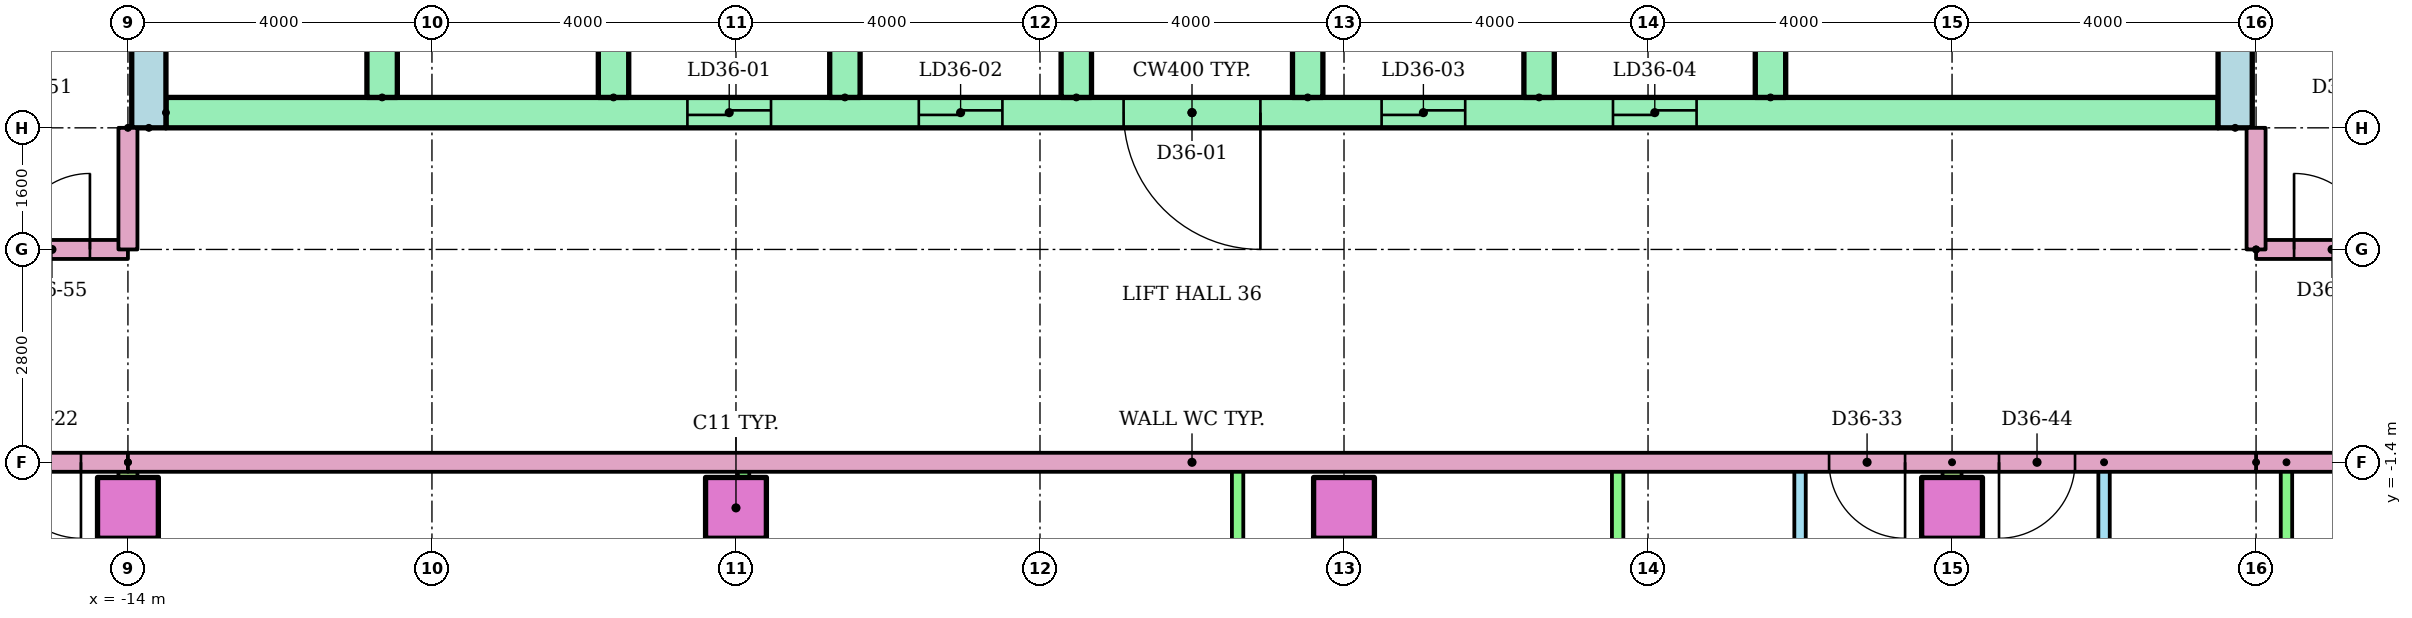
"""IFC4 building model, lengths in metres.
Left out: names, types, materials, properties, quantities, classifications, styles, units other than length and angle.
Written with IfcOpenShell. Run it as: python <this file> out.ifc"""

import sys

from ifc_helpers import new_model, si_unit, direction, frame, frame_2d, origin, origin_2d, place, context, subcontext, project, spatial, rectangle, extrude, element, fill, save


model = new_model("IFC4")
c1 = context("Model", 3, precision=1e-05, world=origin(), true_north=direction((0.0, 1.0)))
c2 = subcontext(c1, "Body", "Model", "MODEL_VIEW")
j1 = project(units=[si_unit("LENGTHUNIT", "METRE"), si_unit("PLANEANGLEUNIT", "RADIAN")], contexts=[c1])
p1 = place(None, origin())
s1 = spatial("IfcSite", under=j1, at=p1, CompositionType="ELEMENT")
p2 = place(p1, origin())
s2 = spatial("IfcBuilding", under=s1, at=p2, CompositionType="ELEMENT")
p3 = place(p2, frame((0.0, 0.0, 139.0)))
s3 = spatial("IfcBuildingStorey", under=s2, at=p3, CompositionType="ELEMENT", Elevation=139.0)
for number, where in (
    (1, (-14.0, -2.0, 0.0)),
    (2, (-6.0, -2.0, 0.0)),
    (3, (2.0, -2.0, 0.0)),
    (4, (10.0, -2.0, 0.0)),
):
    element("IfcColumn", number, at=place(p3, frame(where)), inside=s3, PredefinedType="COLUMN", context=c2, shape_type="SweptSolid", body=[
        extrude(rectangle(XDim=0.8, YDim=0.8, at=origin_2d()), origin(), (0.0, 0.0, 1.0), 3.2),
    ])
for number, where, z_axis, x_axis in (
    (5, (-13.725, 3.0, 0.0), (0.0, 0.0, 1.0), (0.0, 1.0, 0.0)),
    (6, (13.725, 3.0, 0.0), (0.0, 0.0, 1.0), (0.0, 1.0, 0.0)),
):
    element("IfcWall", number, at=place(p3, frame(where, z_axis=z_axis, x_axis=x_axis)), inside=s3, PredefinedType="SHEAR", context=c2, shape_type="SweptSolid", body=[
        extrude(rectangle(XDim=17.0, YDim=0.45, at=frame_2d((8.5, 0.0))), origin(), (0.0, 0.0, 1.0), 2.92),
    ])
p4 = place(p3, frame((-13.5, 3.2, 0.0)))
e7 = element("IfcWall", 7, at=p4, inside=s3, PredefinedType="SHEAR", context=c2, shape_type="SweptSolid", body=[
    extrude(rectangle(XDim=27.0, YDim=0.4, at=frame_2d((13.5, 0.0))), origin(), (0.0, 0.0, 1.0), 2.92),
])
p5 = place(p4, frame((6.861, 0.0, 0.0)))
e8 = element("IfcOpeningElement", 8, at=p5, cuts=e7, PredefinedType="OPENING", context=c2, shape_type="SweptSolid", body=[
    extrude(rectangle(XDim=1.1, YDim=2.1, at=frame_2d((0.55, 1.05))), frame((0.0, 0.21, 0.0), z_axis=(0.0, -1.0, 0.0), x_axis=(1.0, 0.0, 0.0)), (0.0, 0.0, 1.0), 0.42),
])
p6 = place(p4, frame((9.906, 0.0, 0.0)))
e9 = element("IfcOpeningElement", 9, at=p6, cuts=e7, PredefinedType="OPENING", context=c2, shape_type="SweptSolid", body=[
    extrude(rectangle(XDim=1.1, YDim=2.1, at=frame_2d((0.55, 1.05))), frame((0.0, 0.21, 0.0), z_axis=(0.0, -1.0, 0.0), x_axis=(1.0, 0.0, 0.0)), (0.0, 0.0, 1.0), 0.42),
])
p7 = place(p4, frame((15.994, 0.0, 0.0)))
e10 = element("IfcOpeningElement", 10, at=p7, cuts=e7, PredefinedType="OPENING", context=c2, shape_type="SweptSolid", body=[
    extrude(rectangle(XDim=1.1, YDim=2.1, at=frame_2d((0.55, 1.05))), frame((0.0, 0.21, 0.0), z_axis=(0.0, -1.0, 0.0), x_axis=(1.0, 0.0, 0.0)), (0.0, 0.0, 1.0), 0.42),
])
p8 = place(p4, frame((19.039, 0.0, 0.0)))
e11 = element("IfcOpeningElement", 11, at=p8, cuts=e7, PredefinedType="OPENING", context=c2, shape_type="SweptSolid", body=[
    extrude(rectangle(XDim=1.1, YDim=2.1, at=frame_2d((0.55, 1.05))), frame((0.0, 0.21, 0.0), z_axis=(0.0, -1.0, 0.0), x_axis=(1.0, 0.0, 0.0)), (0.0, 0.0, 1.0), 0.42),
])
p9 = place(p4, frame((12.6, 0.0, 0.0)))
e12 = element("IfcOpeningElement", 12, at=p9, cuts=e7, PredefinedType="OPENING", context=c2, shape_type="SweptSolid", body=[
    extrude(rectangle(XDim=1.8, YDim=2.1, at=frame_2d((0.9, 1.05))), frame((0.0, 0.21, 0.0), z_axis=(0.0, -1.0, 0.0), x_axis=(1.0, 0.0, 0.0)), (0.0, 0.0, 1.0), 0.42),
])
for number, where, z_axis, x_axis in (
    (13, (-10.656, 3.4, 0.0), (0.0, 0.0, 1.0), (0.0, 1.0, 0.0)),
    (14, (-7.611, 3.4, 0.0), (0.0, 0.0, 1.0), (0.0, 1.0, 0.0)),
    (15, (-4.567, 3.4, 0.0), (0.0, 0.0, 1.0), (0.0, 1.0, 0.0)),
    (16, (-1.522, 3.4, 0.0), (0.0, 0.0, 1.0), (0.0, 1.0, 0.0)),
    (17, (1.522, 3.4, 0.0), (0.0, 0.0, 1.0), (0.0, 1.0, 0.0)),
    (18, (4.567, 3.4, 0.0), (0.0, 0.0, 1.0), (0.0, 1.0, 0.0)),
    (19, (7.611, 3.4, 0.0), (0.0, 0.0, 1.0), (0.0, 1.0, 0.0)),
):
    element("IfcWall", number, at=place(p3, frame(where, z_axis=z_axis, x_axis=x_axis)), inside=s3, PredefinedType="SHEAR", context=c2, shape_type="SweptSolid", body=[
        extrude(rectangle(XDim=3.0, YDim=0.4, at=frame_2d((1.5, 0.0))), origin(), (0.0, 0.0, 1.0), 2.92),
    ])
p10 = place(p3, frame((8.0, -6.8, 0.0), z_axis=(0.0, 0.0, 1.0), x_axis=(0.0, 1.0, 0.0)))
e20 = element("IfcWall", 20, at=p10, inside=s3, PredefinedType="PARTITIONING", context=c2, shape_type="SweptSolid", body=[
    extrude(rectangle(XDim=5.4, YDim=0.15, at=frame_2d((2.7, 0.0))), origin(), (0.0, 0.0, 1.0), 2.4),
])
p11 = place(p10, frame((3.45, 0.0, 0.0)))
e21 = element("IfcOpeningElement", 21, at=p11, cuts=e20, PredefinedType="OPENING", context=c2, shape_type="SweptSolid", body=[
    extrude(rectangle(XDim=0.9, YDim=2.1, at=frame_2d((0.45, 1.05))), frame((0.0, 0.085, 0.0), z_axis=(0.0, -1.0, 0.0), x_axis=(1.0, 0.0, 0.0)), (0.0, 0.0, 1.0), 0.17),
])
p12 = place(p10, frame((0.8, 0.0, 0.0)))
e22 = element("IfcOpeningElement", 22, at=p12, cuts=e20, PredefinedType="OPENING", context=c2, shape_type="SweptSolid", body=[
    extrude(rectangle(XDim=0.8, YDim=2.1, at=frame_2d((0.4, 1.05))), frame((0.0, 0.085, 0.0), z_axis=(0.0, -1.0, 0.0), x_axis=(1.0, 0.0, 0.0)), (0.0, 0.0, 1.0), 0.17),
])
for number, where, z_axis, x_axis in (
    (23, (5.6, -6.8, 0.0), (0.0, 0.0, 1.0), (0.0, 1.0, 0.0)),
    (24, (0.6, -6.8, 0.0), (0.0, 0.0, 1.0), (0.0, 1.0, 0.0)),
    (25, (-5.9, -6.8, 0.0), (0.0, 0.0, 1.0), (0.0, 1.0, 0.0)),
):
    element("IfcWall", number, at=place(p3, frame(where, z_axis=z_axis, x_axis=x_axis)), inside=s3, PredefinedType="PARTITIONING", context=c2, shape_type="SweptSolid", body=[
        extrude(rectangle(XDim=5.4, YDim=0.15, at=frame_2d((2.7, 0.0))), origin(), (0.0, 0.0, 1.0), 2.4),
    ])
p13 = place(p3, frame((-14.0, -1.4, 0.0), z_axis=(0.0, 0.0, 1.0), x_axis=(0.0, -1.0, 0.0)))
e26 = element("IfcWall", 26, at=p13, inside=s3, PredefinedType="PARTITIONING", context=c2, shape_type="SweptSolid", body=[
    extrude(rectangle(XDim=14.91, YDim=0.25, at=frame_2d((7.455, 0.0))), origin(), (0.0, 0.0, 1.0), 2.4),
])
p14 = place(p3, frame((12.0, -1.4, 0.0), z_axis=(0.0, 0.0, 1.0), x_axis=(0.0, -1.0, 0.0)))
e27 = element("IfcWall", 27, at=p14, inside=s3, PredefinedType="PARTITIONING", context=c2, shape_type="SweptSolid", body=[
    extrude(rectangle(XDim=5.4, YDim=0.15, at=frame_2d((2.7, 0.0))), origin(), (0.0, 0.0, 1.0), 2.4),
])
p15 = place(p14, frame((1.05, 0.0, 0.0)))
e28 = element("IfcOpeningElement", 28, at=p15, cuts=e27, PredefinedType="OPENING", context=c2, shape_type="SweptSolid", body=[
    extrude(rectangle(XDim=0.9, YDim=2.1, at=frame_2d((0.45, 1.05))), frame((0.0, 0.085, 0.0), z_axis=(0.0, -1.0, 0.0), x_axis=(1.0, 0.0, 0.0)), (0.0, 0.0, 1.0), 0.17),
])
p16 = place(p14, frame((3.8, 0.0, 0.0)))
e29 = element("IfcOpeningElement", 29, at=p16, cuts=e27, PredefinedType="OPENING", context=c2, shape_type="SweptSolid", body=[
    extrude(rectangle(XDim=0.8, YDim=2.1, at=frame_2d((0.4, 1.05))), frame((0.0, 0.085, 0.0), z_axis=(0.0, -1.0, 0.0), x_axis=(1.0, 0.0, 0.0)), (0.0, 0.0, 1.0), 0.17),
])
p17 = place(p3, frame((14.4, -1.4, 0.0), z_axis=(0.0, 0.0, 1.0), x_axis=(0.0, -1.0, 0.0)))
e30 = element("IfcWall", 30, at=p17, inside=s3, PredefinedType="PARTITIONING", context=c2, shape_type="SweptSolid", body=[
    extrude(rectangle(XDim=5.4, YDim=0.15, at=frame_2d((2.7, 0.0))), origin(), (0.0, 0.0, 1.0), 2.4),
])
p18 = place(p3, frame((10.0, -1.4, 0.0), z_axis=(0.0, 0.0, 1.0), x_axis=(0.0, -1.0, 0.0)))
e31 = element("IfcWall", 31, at=p18, inside=s3, PredefinedType="PARTITIONING", context=c2, shape_type="SweptSolid", body=[
    extrude(rectangle(XDim=14.91, YDim=0.25, at=frame_2d((7.455, 0.0))), origin(), (0.0, 0.0, 1.0), 2.4),
])
p19 = place(p3, frame((-14.0, -1.4, 0.0), z_axis=(0.0, 0.0, 1.0), x_axis=(-1.0, 0.0, 0.0)))
e32 = element("IfcWall", 32, at=p19, inside=s3, PredefinedType="PARTITIONING", context=c2, shape_type="SweptSolid", body=[
    extrude(rectangle(XDim=15.0, YDim=0.25, at=frame_2d((7.5, 0.0))), origin(), (0.0, 0.0, 1.0), 2.4),
])
p20 = place(p19, frame((0.618, 0.0, 0.0)))
e33 = element("IfcOpeningElement", 33, at=p20, cuts=e32, PredefinedType="OPENING", context=c2, shape_type="SweptSolid", body=[
    extrude(rectangle(XDim=1.0, YDim=2.1, at=frame_2d((0.5, 1.05))), frame((0.0, 0.135, 0.0), z_axis=(0.0, -1.0, 0.0), x_axis=(1.0, 0.0, 0.0)), (0.0, 0.0, 1.0), 0.27),
])
p21 = place(p3, frame((29.0, -1.4, 0.0), z_axis=(0.0, 0.0, 1.0), x_axis=(-1.0, 0.0, 0.0)))
e34 = element("IfcWall", 34, at=p21, inside=s3, PredefinedType="PARTITIONING", context=c2, shape_type="SweptSolid", body=[
    extrude(rectangle(XDim=15.0, YDim=0.25, at=frame_2d((7.5, 0.0))), origin(), (0.0, 0.0, 1.0), 2.4),
])
p22 = place(p3, frame((-29.0, 1.4, 0.0)))
e35 = element("IfcWall", 35, at=p22, inside=s3, PredefinedType="PARTITIONING", context=c2, shape_type="SweptSolid", body=[
    extrude(rectangle(XDim=15.0, YDim=0.25, at=frame_2d((7.5, 0.0))), origin(), (0.0, 0.0, 1.0), 2.4),
])
p23 = place(p22, frame((5.382, 0.0, 0.0)))
e36 = element("IfcOpeningElement", 36, at=p23, cuts=e35, PredefinedType="OPENING", context=c2, shape_type="SweptSolid", body=[
    extrude(rectangle(XDim=1.0, YDim=2.1, at=frame_2d((0.5, 1.05))), frame((0.0, 0.135, 0.0), z_axis=(0.0, -1.0, 0.0), x_axis=(1.0, 0.0, 0.0)), (0.0, 0.0, 1.0), 0.27),
])
p24 = place(p22, frame((13.5, 0.0, 0.0)))
e37 = element("IfcOpeningElement", 37, at=p24, cuts=e35, PredefinedType="OPENING", context=c2, shape_type="SweptSolid", body=[
    extrude(rectangle(XDim=1.0, YDim=2.1, at=frame_2d((0.5, 1.05))), frame((0.0, 0.135, 0.0), z_axis=(0.0, -1.0, 0.0), x_axis=(1.0, 0.0, 0.0)), (0.0, 0.0, 1.0), 0.27),
])
p25 = place(p3, frame((14.0, 1.4, 0.0)))
e38 = element("IfcWall", 38, at=p25, inside=s3, PredefinedType="PARTITIONING", context=c2, shape_type="SweptSolid", body=[
    extrude(rectangle(XDim=15.0, YDim=0.25, at=frame_2d((7.5, 0.0))), origin(), (0.0, 0.0, 1.0), 2.4),
])
p26 = place(p25, frame((0.5, 0.0, 0.0)))
e39 = element("IfcOpeningElement", 39, at=p26, cuts=e38, PredefinedType="OPENING", context=c2, shape_type="SweptSolid", body=[
    extrude(rectangle(XDim=1.0, YDim=2.1, at=frame_2d((0.5, 1.05))), frame((0.0, 0.135, 0.0), z_axis=(0.0, -1.0, 0.0), x_axis=(1.0, 0.0, 0.0)), (0.0, 0.0, 1.0), 0.27),
])
p27 = place(p3, frame((14.0, -1.4, 0.0), z_axis=(0.0, 0.0, 1.0), x_axis=(-1.0, 0.0, 0.0)))
e40 = element("IfcWall", 40, at=p27, inside=s3, PredefinedType="PARTITIONING", context=c2, shape_type="SweptSolid", body=[
    extrude(rectangle(XDim=28.0, YDim=0.25, at=frame_2d((14.0, 0.0))), origin(), (0.0, 0.0, 1.0), 2.4),
])
p28 = place(p27, frame((4.618, 0.0, 0.0)))
e41 = element("IfcOpeningElement", 41, at=p28, cuts=e40, PredefinedType="OPENING", context=c2, shape_type="SweptSolid", body=[
    extrude(rectangle(XDim=1.0, YDim=2.1, at=frame_2d((0.5, 1.05))), frame((0.0, 0.135, 0.0), z_axis=(0.0, -1.0, 0.0), x_axis=(1.0, 0.0, 0.0)), (0.0, 0.0, 1.0), 0.27),
])
p29 = place(p27, frame((2.382, 0.0, 0.0)))
e42 = element("IfcOpeningElement", 42, at=p29, cuts=e40, PredefinedType="OPENING", context=c2, shape_type="SweptSolid", body=[
    extrude(rectangle(XDim=1.0, YDim=2.1, at=frame_2d((0.5, 1.05))), frame((0.0, 0.135, 0.0), z_axis=(0.0, -1.0, 0.0), x_axis=(1.0, 0.0, 0.0)), (0.0, 0.0, 1.0), 0.27),
])
for number, where, z_axis, x_axis in (
    (43, (-14.0, 3.0, 0.0), (0.0, 0.0, 1.0), (0.0, -1.0, 0.0)),
    (44, (14.0, 1.4, 0.0), (0.0, 0.0, 1.0), (0.0, 1.0, 0.0)),
):
    element("IfcWall", number, at=place(p3, frame(where, z_axis=z_axis, x_axis=x_axis)), inside=s3, PredefinedType="PARTITIONING", context=c2, shape_type="SweptSolid", body=[
        extrude(rectangle(XDim=1.6, YDim=0.25, at=frame_2d((0.8, 0.0))), origin(), (0.0, 0.0, 1.0), 2.4),
    ])
p30 = place(p5, origin())
e45 = element("IfcDoor", 45, at=p30, inside=s3, OperationType="SLIDING_TO_LEFT", PredefinedType="DOOR", context=c2, shape_type="SweptSolid", body=[
    extrude(rectangle(XDim=1.1, YDim=2.1, at=frame_2d((0.55, 1.05))), frame((0.0, 0.025, 0.0), z_axis=(0.0, -1.0, 0.0), x_axis=(1.0, 0.0, 0.0)), (0.0, 0.0, 1.0), 0.05),
])
fill(e8, e45)
p31 = place(p6, origin())
e46 = element("IfcDoor", 46, at=p31, inside=s3, OperationType="SLIDING_TO_LEFT", PredefinedType="DOOR", context=c2, shape_type="SweptSolid", body=[
    extrude(rectangle(XDim=1.1, YDim=2.1, at=frame_2d((0.55, 1.05))), frame((0.0, 0.025, 0.0), z_axis=(0.0, -1.0, 0.0), x_axis=(1.0, 0.0, 0.0)), (0.0, 0.0, 1.0), 0.05),
])
fill(e9, e46)
p32 = place(p7, origin())
e47 = element("IfcDoor", 47, at=p32, inside=s3, OperationType="SLIDING_TO_LEFT", PredefinedType="DOOR", context=c2, shape_type="SweptSolid", body=[
    extrude(rectangle(XDim=1.1, YDim=2.1, at=frame_2d((0.55, 1.05))), frame((0.0, 0.025, 0.0), z_axis=(0.0, -1.0, 0.0), x_axis=(1.0, 0.0, 0.0)), (0.0, 0.0, 1.0), 0.05),
])
fill(e10, e47)
p33 = place(p8, origin())
e48 = element("IfcDoor", 48, at=p33, inside=s3, OperationType="SLIDING_TO_LEFT", PredefinedType="DOOR", context=c2, shape_type="SweptSolid", body=[
    extrude(rectangle(XDim=1.1, YDim=2.1, at=frame_2d((0.55, 1.05))), frame((0.0, 0.025, 0.0), z_axis=(0.0, -1.0, 0.0), x_axis=(1.0, 0.0, 0.0)), (0.0, 0.0, 1.0), 0.05),
])
fill(e11, e48)
p34 = place(p9, frame((1.8, 0.0, 0.0), z_axis=(0.0, 0.0, 1.0), x_axis=(-1.0, 0.0, 0.0)))
e49 = element("IfcDoor", 49, at=p34, inside=s3, OperationType="DOUBLE_DOOR_SINGLE_SWING", PredefinedType="DOOR", context=c2, shape_type="SweptSolid", body=[
    extrude(rectangle(XDim=1.8, YDim=2.1, at=frame_2d((0.9, 1.05))), frame((0.0, 0.025, 0.0), z_axis=(0.0, -1.0, 0.0), x_axis=(1.0, 0.0, 0.0)), (0.0, 0.0, 1.0), 0.05),
])
fill(e12, e49)
p35 = place(p20, origin())
e50 = element("IfcDoor", 50, at=p35, inside=s3, OperationType="SINGLE_SWING_LEFT", PredefinedType="DOOR", context=c2, shape_type="SweptSolid", body=[
    extrude(rectangle(XDim=1.0, YDim=2.1, at=frame_2d((0.5, 1.05))), frame((0.0, 0.025, 0.0), z_axis=(0.0, -1.0, 0.0), x_axis=(1.0, 0.0, 0.0)), (0.0, 0.0, 1.0), 0.05),
])
fill(e33, e50)
p36 = place(p28, origin())
e51 = element("IfcDoor", 51, at=p36, inside=s3, OperationType="SINGLE_SWING_LEFT", PredefinedType="DOOR", context=c2, shape_type="SweptSolid", body=[
    extrude(rectangle(XDim=1.0, YDim=2.1, at=frame_2d((0.5, 1.05))), frame((0.0, 0.025, 0.0), z_axis=(0.0, -1.0, 0.0), x_axis=(1.0, 0.0, 0.0)), (0.0, 0.0, 1.0), 0.05),
])
fill(e41, e51)
p37 = place(p29, origin())
e52 = element("IfcDoor", 52, at=p37, inside=s3, OperationType="SINGLE_SWING_RIGHT", PredefinedType="DOOR", context=c2, shape_type="SweptSolid", body=[
    extrude(rectangle(XDim=1.0, YDim=2.1, at=frame_2d((0.5, 1.05))), frame((0.0, 0.025, 0.0), z_axis=(0.0, -1.0, 0.0), x_axis=(1.0, 0.0, 0.0)), (0.0, 0.0, 1.0), 0.05),
])
fill(e42, e52)
p38 = place(p24, origin())
e53 = element("IfcDoor", 53, at=p38, inside=s3, OperationType="SINGLE_SWING_RIGHT", PredefinedType="DOOR", context=c2, shape_type="SweptSolid", body=[
    extrude(rectangle(XDim=1.0, YDim=2.1, at=frame_2d((0.5, 1.05))), frame((0.0, 0.025, 0.0), z_axis=(0.0, -1.0, 0.0), x_axis=(1.0, 0.0, 0.0)), (0.0, 0.0, 1.0), 0.05),
])
fill(e37, e53)
p39 = place(p26, origin())
e54 = element("IfcDoor", 54, at=p39, inside=s3, OperationType="SINGLE_SWING_LEFT", PredefinedType="DOOR", context=c2, shape_type="SweptSolid", body=[
    extrude(rectangle(XDim=1.0, YDim=2.1, at=frame_2d((0.5, 1.05))), frame((0.0, 0.025, 0.0), z_axis=(0.0, -1.0, 0.0), x_axis=(1.0, 0.0, 0.0)), (0.0, 0.0, 1.0), 0.05),
])
fill(e39, e54)
save(model, sys.argv[1])
